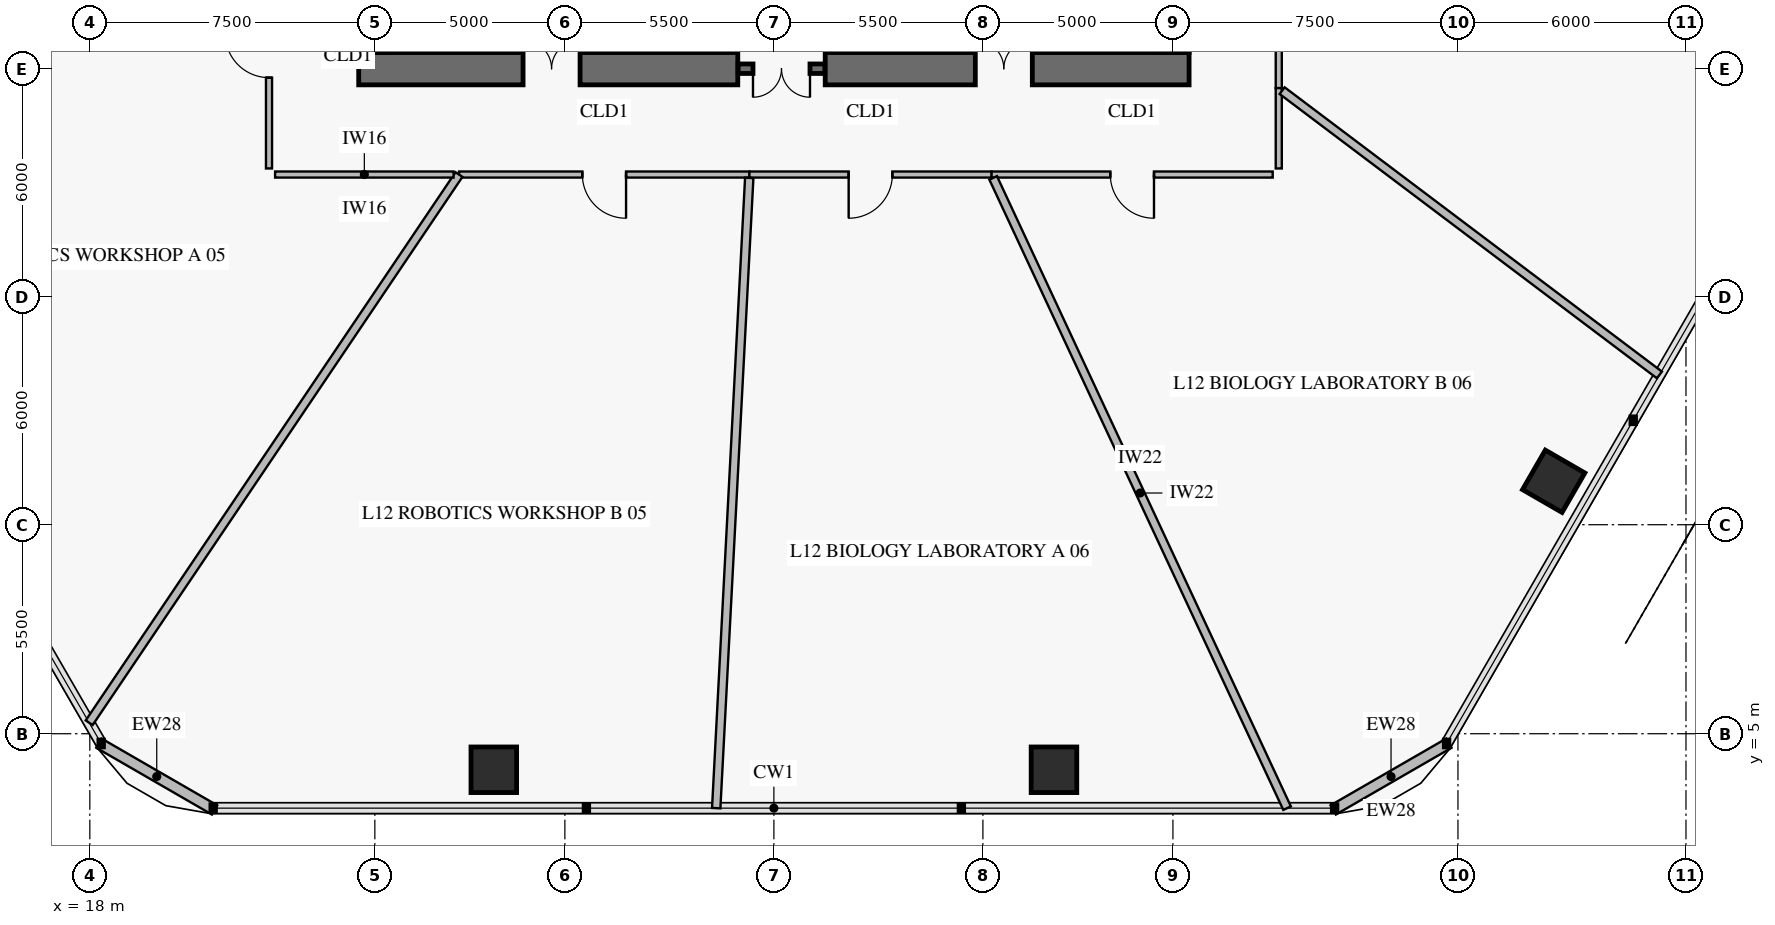
"""IFC4 building model, lengths in metres.
Left out: names, types, materials, properties, quantities, classifications, styles, units other than length and angle.
Written with IfcOpenShell. Run it as: python <this file> out.ifc"""

import sys

from ifc_helpers import new_model, si_unit, direction, frame, frame_2d, origin, origin_2d, place, context, subcontext, project, spatial, rectangle, extrude, element, fill, save


model = new_model("IFC4")
c1 = context("Model", 3, precision=1e-05, world=origin(), true_north=direction((0.0, 1.0)))
c2 = subcontext(c1, "Body", "Model", "MODEL_VIEW")
j1 = project(units=[si_unit("LENGTHUNIT", "METRE"), si_unit("PLANEANGLEUNIT", "RADIAN")], contexts=[c1])
p1 = place(None, origin())
s1 = spatial("IfcSite", under=j1, at=p1, CompositionType="ELEMENT")
p2 = place(p1, origin())
s2 = spatial("IfcBuilding", under=s1, at=p2, CompositionType="ELEMENT")
p3 = place(p2, frame((0.0, 0.0, 49.8)))
s3 = spatial("IfcBuildingStorey", under=s2, at=p3, CompositionType="ELEMENT", Elevation=49.8)
p4 = place(p3, frame((25.075, 22.5, 0.0), z_axis=(0.0, 0.0, 1.0), x_axis=(1.0, 0.0, 0.0)))
e1 = element("IfcWall", 1, at=p4, inside=s3, PredefinedType="SHEAR", context=c2, shape_type="SweptSolid", body=[
    extrude(rectangle(XDim=9.975, YDim=0.85, at=frame_2d((4.988, 0.0))), origin(), (0.0, 0.0, 1.0), 4.2),
])
p5 = place(p4, frame((4.325, 0.0, 0.0)))
e2 = element("IfcOpeningElement", 2, at=p5, cuts=e1, PredefinedType="OPENING", context=c2, shape_type="SweptSolid", body=[
    extrude(rectangle(XDim=1.5, YDim=2.15, at=frame_2d((0.75, 1.075))), frame((0.0, 0.437, 0.0), z_axis=(0.0, -1.0, 0.0), x_axis=(1.0, 0.0, 0.0)), (0.0, 0.0, 1.0), 0.874),
])
p6 = place(p3, frame((37.35, 22.5, 0.0), z_axis=(0.0, 0.0, 1.0), x_axis=(1.0, 0.0, 0.0)))
e3 = element("IfcWall", 3, at=p6, inside=s3, PredefinedType="SHEAR", context=c2, shape_type="SweptSolid", body=[
    extrude(rectangle(XDim=9.575, YDim=0.85, at=frame_2d((4.788, 0.0))), origin(), (0.0, 0.0, 1.0), 4.2),
])
p7 = place(p6, frame((3.95, 0.0, 0.0)))
e4 = element("IfcOpeningElement", 4, at=p7, cuts=e3, PredefinedType="OPENING", context=c2, shape_type="SweptSolid", body=[
    extrude(rectangle(XDim=1.5, YDim=2.15, at=frame_2d((0.75, 1.075))), frame((0.0, 0.437, 0.0), z_axis=(0.0, -1.0, 0.0), x_axis=(1.0, 0.0, 0.0)), (0.0, 0.0, 1.0), 0.874),
])
p8 = place(p3, frame((25.5, 22.925, 0.0), z_axis=(0.0, 0.0, 1.0), x_axis=(0.0, 1.0, 0.0)))
e5 = element("IfcWall", 5, at=p8, inside=s3, PredefinedType="SHEAR", context=c2, shape_type="SweptSolid", body=[
    extrude(rectangle(XDim=18.15, YDim=0.85, at=frame_2d((9.075, 0.0))), origin(), (0.0, 0.0, 1.0), 4.2),
])
p9 = place(p8, frame((8.825, 0.0, 0.0)))
e6 = element("IfcOpeningElement", 6, at=p9, cuts=e5, PredefinedType="OPENING", context=c2, shape_type="SweptSolid", body=[
    extrude(rectangle(XDim=1.1, YDim=2.15, at=frame_2d((0.55, 1.075))), frame((0.0, 0.437, 0.0), z_axis=(0.0, -1.0, 0.0), x_axis=(1.0, 0.0, 0.0)), (0.0, 0.0, 1.0), 0.874),
])
p10 = place(p3, frame((46.5, 22.925, 0.0), z_axis=(0.0, 0.0, 1.0), x_axis=(0.0, 1.0, 0.0)))
e7 = element("IfcWall", 7, at=p10, inside=s3, PredefinedType="SHEAR", context=c2, shape_type="SweptSolid", body=[
    extrude(rectangle(XDim=18.15, YDim=0.85, at=frame_2d((9.075, 0.0))), origin(), (0.0, 0.0, 1.0), 4.2),
])
p11 = place(p10, frame((8.825, 0.0, 0.0)))
e8 = element("IfcOpeningElement", 8, at=p11, cuts=e7, PredefinedType="OPENING", context=c2, shape_type="SweptSolid", body=[
    extrude(rectangle(XDim=1.1, YDim=2.15, at=frame_2d((0.55, 1.075))), frame((0.0, 0.437, 0.0), z_axis=(0.0, -1.0, 0.0), x_axis=(1.0, 0.0, 0.0)), (0.0, 0.0, 1.0), 0.874),
])
for number, where, z_axis, x_axis in (
    (9, (28.63, 4.052, 0.0), (0.0, 0.0, 1.0), (1.0, 0.0, 0.0)),
    (10, (43.37, 4.052, 0.0), (0.0, 0.0, 1.0), (1.0, 0.0, 0.0)),
    (11, (56.519, 11.643, 0.0), (0.0, 0.0, 1.0), (0.5, 0.866, 0.0)),
):
    element("IfcColumn", number, at=place(p3, frame(where, z_axis=z_axis, x_axis=x_axis)), inside=s3, PredefinedType="COLUMN", context=c2, shape_type="SweptSolid", body=[
        extrude(rectangle(XDim=1.2, YDim=1.2, at=origin_2d()), origin(), (0.0, 0.0, 1.0), 3.92),
    ])
for number, where, z_axis, x_axis in (
    (12, (53.761, 4.751, 0.0), (0.0, 0.0, 1.0), (-0.866, -0.5, 0.0)),
    (13, (21.283, 2.994, 0.0), (0.0, 0.0, 1.0), (-0.866, 0.5, 0.0)),
):
    element("IfcWall", number, at=place(p3, frame(where, z_axis=z_axis, x_axis=x_axis)), inside=s3, PredefinedType="SOLIDWALL", context=c2, shape_type="SweptSolid", body=[
        extrude(rectangle(XDim=3.515, YDim=0.28, at=frame_2d((1.757, 0.0))), origin(), (0.0, 0.0, 1.0), 3.92),
    ])
p12 = place(p3, frame((35.06, 22.5, 0.0), z_axis=(0.0, 0.0, 1.0), x_axis=(1.0, 0.0, 0.0)))
e14 = element("IfcWall", 14, at=p12, inside=s3, PredefinedType="SOLIDWALL", context=c2, shape_type="SweptSolid", body=[
    extrude(rectangle(XDim=2.28, YDim=0.25, at=frame_2d((1.14, 0.0))), origin(), (0.0, 0.0, 1.0), 4.2),
])
p13 = place(p12, frame((0.39, 0.0, 0.0)))
e15 = element("IfcOpeningElement", 15, at=p13, cuts=e14, PredefinedType="OPENING", context=c2, shape_type="SweptSolid", body=[
    extrude(rectangle(XDim=1.5, YDim=2.15, at=frame_2d((0.75, 1.075))), frame((0.0, 0.137, 0.0), z_axis=(0.0, -1.0, 0.0), x_axis=(1.0, 0.0, 0.0)), (0.0, 0.0, 1.0), 0.274),
])
p14 = place(p3, frame((22.715, 25.805, 0.0), z_axis=(0.0, 0.0, 1.0), x_axis=(0.0, -1.0, 0.0)))
e16 = element("IfcWall", 16, at=p14, inside=s3, PredefinedType="PARTITIONING", context=c2, shape_type="SweptSolid", body=[
    extrude(rectangle(XDim=5.93, YDim=0.16, at=frame_2d((2.965, 0.0))), origin(), (0.0, 0.0, 1.0), 3.92),
])
p15 = place(p14, frame((2.39, 0.0, 0.0)))
e17 = element("IfcOpeningElement", 17, at=p15, cuts=e16, PredefinedType="OPENING", context=c2, shape_type="SweptSolid", body=[
    extrude(rectangle(XDim=1.15, YDim=2.2, at=frame_2d((0.575, 1.1))), frame((0.0, 0.092, 0.0), z_axis=(0.0, -1.0, 0.0), x_axis=(1.0, 0.0, 0.0)), (0.0, 0.0, 1.0), 0.184),
])
p16 = place(p3, frame((27.714, 19.715, 0.0), z_axis=(0.0, 0.0, 1.0), x_axis=(1.0, 0.0, 0.0)))
e18 = element("IfcWall", 18, at=p16, inside=s3, PredefinedType="PARTITIONING", context=c2, shape_type="SweptSolid", body=[
    extrude(rectangle(XDim=7.643, YDim=0.16, at=frame_2d((3.821, 0.0))), origin(), (0.0, 0.0, 1.0), 3.22),
])
p17 = place(p16, frame((3.246, 0.0, 0.0)))
e19 = element("IfcOpeningElement", 19, at=p17, cuts=e18, PredefinedType="OPENING", context=c2, shape_type="SweptSolid", body=[
    extrude(rectangle(XDim=1.15, YDim=2.2, at=frame_2d((0.575, 1.1))), frame((0.0, 0.092, 0.0), z_axis=(0.0, -1.0, 0.0), x_axis=(1.0, 0.0, 0.0)), (0.0, 0.0, 1.0), 0.184),
])
p18 = place(p3, frame((35.356, 19.715, 0.0), z_axis=(0.0, 0.0, 1.0), x_axis=(1.0, 0.0, 0.0)))
e20 = element("IfcWall", 20, at=p18, inside=s3, PredefinedType="PARTITIONING", context=c2, shape_type="SweptSolid", body=[
    extrude(rectangle(XDim=6.372, YDim=0.16, at=frame_2d((3.186, 0.0))), origin(), (0.0, 0.0, 1.0), 3.22),
])
p19 = place(p18, frame((2.611, 0.0, 0.0)))
e21 = element("IfcOpeningElement", 21, at=p19, cuts=e20, PredefinedType="OPENING", context=c2, shape_type="SweptSolid", body=[
    extrude(rectangle(XDim=1.15, YDim=2.2, at=frame_2d((0.575, 1.1))), frame((0.0, 0.092, 0.0), z_axis=(0.0, -1.0, 0.0), x_axis=(1.0, 0.0, 0.0)), (0.0, 0.0, 1.0), 0.184),
])
p20 = place(p3, frame((41.729, 19.715, 0.0), z_axis=(0.0, 0.0, 1.0), x_axis=(1.0, 0.0, 0.0)))
e22 = element("IfcWall", 22, at=p20, inside=s3, PredefinedType="PARTITIONING", context=c2, shape_type="SweptSolid", body=[
    extrude(rectangle(XDim=7.396, YDim=0.16, at=frame_2d((3.698, 0.0))), origin(), (0.0, 0.0, 1.0), 3.22),
])
p21 = place(p20, frame((3.123, 0.0, 0.0)))
e23 = element("IfcOpeningElement", 23, at=p21, cuts=e22, PredefinedType="OPENING", context=c2, shape_type="SweptSolid", body=[
    extrude(rectangle(XDim=1.15, YDim=2.2, at=frame_2d((0.575, 1.1))), frame((0.0, 0.092, 0.0), z_axis=(0.0, -1.0, 0.0), x_axis=(1.0, 0.0, 0.0)), (0.0, 0.0, 1.0), 0.184),
])
p22 = place(p3, frame((49.285, 21.989, 0.0), z_axis=(0.0, 0.0, 1.0), x_axis=(0.0, 1.0, 0.0)))
e24 = element("IfcWall", 24, at=p22, inside=s3, PredefinedType="PARTITIONING", context=c2, shape_type="SweptSolid", body=[
    extrude(rectangle(XDim=13.078, YDim=0.16, at=frame_2d((6.539, 0.0))), origin(), (0.0, 0.0, 1.0), 3.22),
])
p23 = place(p22, frame((6.064, 0.0, 0.0)))
e25 = element("IfcOpeningElement", 25, at=p23, cuts=e24, PredefinedType="OPENING", context=c2, shape_type="SweptSolid", body=[
    extrude(rectangle(XDim=0.95, YDim=2.1, at=frame_2d((0.475, 1.05))), frame((0.0, 0.092, 0.0), z_axis=(0.0, -1.0, 0.0), x_axis=(1.0, 0.0, 0.0)), (0.0, 0.0, 1.0), 0.184),
])
p24 = place(p3, frame((22.627, 25.764, 0.0), z_axis=(0.0, 0.0, 1.0), x_axis=(-0.906309468756, -0.422614655263, 0.0)))
e26 = element("IfcWall", 26, at=p24, inside=s3, PredefinedType="PARTITIONING", context=c2, shape_type="SweptSolid", body=[
    extrude(rectangle(XDim=14.313, YDim=0.22, at=frame_2d((7.157, 0.0))), origin(), (0.0, 0.0, 1.0), 3.17),
])
p25 = place(p3, frame((27.714, 19.715, 0.0), z_axis=(0.0, 0.0, 1.0), x_axis=(-0.559192578, -0.829037792088, 0.0)))
e27 = element("IfcWall", 27, at=p25, inside=s3, PredefinedType="PARTITIONING", context=c2, shape_type="SweptSolid", body=[
    extrude(rectangle(XDim=17.401, YDim=0.22, at=frame_2d((8.7, 0.0))), origin(), (0.0, 0.0, 1.0), 3.17),
])
p26 = place(p3, frame((22.875, 19.715, 0.0), z_axis=(0.0, 0.0, 1.0), x_axis=(1.0, 0.0, 0.0)))
e28 = element("IfcWall", 28, at=p26, inside=s3, PredefinedType="PARTITIONING", context=c2, shape_type="SweptSolid", body=[
    extrude(rectangle(XDim=4.696, YDim=0.16, at=frame_2d((2.348, 0.0))), origin(), (0.0, 0.0, 1.0), 3.22),
])
p27 = place(p3, frame((35.352, 19.627, 0.0), z_axis=(0.0, 0.0, 1.0), x_axis=(-0.052331996973, -0.998629742243, 0.0)))
e29 = element("IfcWall", 29, at=p27, inside=s3, PredefinedType="PARTITIONING", context=c2, shape_type="SweptSolid", body=[
    extrude(rectangle(XDim=16.608, YDim=0.22, at=frame_2d((8.304, 0.0))), origin(), (0.0, 0.0, 1.0), 3.17),
])
p28 = place(p3, frame((41.77, 19.627, 0.0), z_axis=(0.0, 0.0, 1.0), x_axis=(0.422616678834, -0.906308525156, 0.0)))
e30 = element("IfcWall", 30, at=p28, inside=s3, PredefinedType="PARTITIONING", context=c2, shape_type="SweptSolid", body=[
    extrude(rectangle(XDim=18.3, YDim=0.22, at=frame_2d((9.15, 0.0))), origin(), (0.0, 0.0, 1.0), 3.17),
])
p29 = place(p3, frame((49.285, 19.875, 0.0), z_axis=(0.0, 0.0, 1.0), x_axis=(0.0, 1.0, 0.0)))
e31 = element("IfcWall", 31, at=p29, inside=s3, PredefinedType="PARTITIONING", context=c2, shape_type="SweptSolid", body=[
    extrude(rectangle(XDim=2.114, YDim=0.16, at=frame_2d((1.057, 0.0))), origin(), (0.0, 0.0, 1.0), 3.92),
])
p30 = place(p3, frame((49.373, 21.923, 0.0), z_axis=(0.0, 0.0, 1.0), x_axis=(0.798630996951, -0.601821012187, 0.0)))
e32 = element("IfcWall", 32, at=p30, inside=s3, PredefinedType="PARTITIONING", context=c2, shape_type="SweptSolid", body=[
    extrude(rectangle(XDim=12.431, YDim=0.22, at=frame_2d((6.215, 0.0))), origin(), (0.0, 0.0, 1.0), 3.17),
])
p31 = place(p5, origin())
e33 = element("IfcDoor", 33, at=p31, inside=s3, OperationType="DOUBLE_DOOR_SINGLE_SWING", PredefinedType="DOOR", context=c2, shape_type="SweptSolid", body=[
    extrude(rectangle(XDim=1.5, YDim=2.15, at=frame_2d((0.75, 1.075))), frame((0.0, 0.025, 0.0), z_axis=(0.0, -1.0, 0.0), x_axis=(1.0, 0.0, 0.0)), (0.0, 0.0, 1.0), 0.05),
])
fill(e2, e33)
p32 = place(p7, origin())
e34 = element("IfcDoor", 34, at=p32, inside=s3, OperationType="DOUBLE_DOOR_SINGLE_SWING", PredefinedType="DOOR", context=c2, shape_type="SweptSolid", body=[
    extrude(rectangle(XDim=1.5, YDim=2.15, at=frame_2d((0.75, 1.075))), frame((0.0, 0.025, 0.0), z_axis=(0.0, -1.0, 0.0), x_axis=(1.0, 0.0, 0.0)), (0.0, 0.0, 1.0), 0.05),
])
fill(e4, e34)
p33 = place(p13, frame((1.5, 0.0, 0.0), z_axis=(0.0, 0.0, 1.0), x_axis=(-1.0, 0.0, 0.0)))
e35 = element("IfcDoor", 35, at=p33, inside=s3, OperationType="DOUBLE_DOOR_SINGLE_SWING", PredefinedType="DOOR", context=c2, shape_type="SweptSolid", body=[
    extrude(rectangle(XDim=1.5, YDim=2.15, at=frame_2d((0.75, 1.075))), frame((0.0, 0.025, 0.0), z_axis=(0.0, -1.0, 0.0), x_axis=(1.0, 0.0, 0.0)), (0.0, 0.0, 1.0), 0.05),
])
fill(e15, e35)
p34 = place(p15, frame((1.15, 0.0, 0.0), z_axis=(0.0, 0.0, 1.0), x_axis=(-1.0, 0.0, 0.0)))
e36 = element("IfcDoor", 36, at=p34, inside=s3, OperationType="SINGLE_SWING_RIGHT", PredefinedType="DOOR", context=c2, shape_type="SweptSolid", body=[
    extrude(rectangle(XDim=1.15, YDim=2.2, at=frame_2d((0.575, 1.1))), frame((0.0, 0.025, 0.0), z_axis=(0.0, -1.0, 0.0), x_axis=(1.0, 0.0, 0.0)), (0.0, 0.0, 1.0), 0.05),
])
fill(e17, e36)
p35 = place(p17, frame((1.15, 0.0, 0.0), z_axis=(0.0, 0.0, 1.0), x_axis=(-1.0, 0.0, 0.0)))
e37 = element("IfcDoor", 37, at=p35, inside=s3, OperationType="SINGLE_SWING_LEFT", PredefinedType="DOOR", context=c2, shape_type="SweptSolid", body=[
    extrude(rectangle(XDim=1.15, YDim=2.2, at=frame_2d((0.575, 1.1))), frame((0.0, 0.025, 0.0), z_axis=(0.0, -1.0, 0.0), x_axis=(1.0, 0.0, 0.0)), (0.0, 0.0, 1.0), 0.05),
])
fill(e19, e37)
p36 = place(p19, frame((1.15, 0.0, 0.0), z_axis=(0.0, 0.0, 1.0), x_axis=(-1.0, 0.0, 0.0)))
e38 = element("IfcDoor", 38, at=p36, inside=s3, OperationType="SINGLE_SWING_RIGHT", PredefinedType="DOOR", context=c2, shape_type="SweptSolid", body=[
    extrude(rectangle(XDim=1.15, YDim=2.2, at=frame_2d((0.575, 1.1))), frame((0.0, 0.025, 0.0), z_axis=(0.0, -1.0, 0.0), x_axis=(1.0, 0.0, 0.0)), (0.0, 0.0, 1.0), 0.05),
])
fill(e21, e38)
p37 = place(p21, frame((1.15, 0.0, 0.0), z_axis=(0.0, 0.0, 1.0), x_axis=(-1.0, 0.0, 0.0)))
e39 = element("IfcDoor", 39, at=p37, inside=s3, OperationType="SINGLE_SWING_LEFT", PredefinedType="DOOR", context=c2, shape_type="SweptSolid", body=[
    extrude(rectangle(XDim=1.15, YDim=2.2, at=frame_2d((0.575, 1.1))), frame((0.0, 0.025, 0.0), z_axis=(0.0, -1.0, 0.0), x_axis=(1.0, 0.0, 0.0)), (0.0, 0.0, 1.0), 0.05),
])
fill(e23, e39)
save(model, sys.argv[1])
